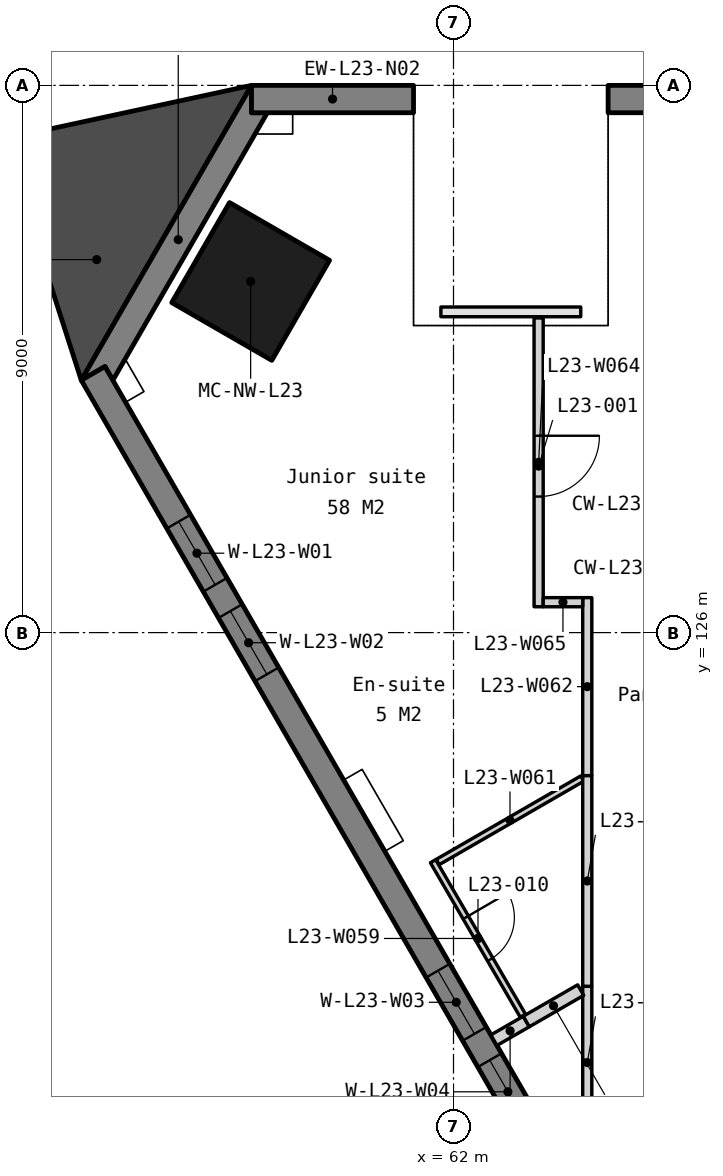
"""IFC4 building model, lengths in metres.
Left out: names, types, materials, properties, quantities, classifications, styles, units other than length and angle.
Written with IfcOpenShell. Run it as: python <this file> out.ifc"""

import sys

from ifc_helpers import new_model, si_unit, direction, frame, frame_2d, origin, origin_2d, place, context, subcontext, project, spatial, polyline, rectangle, outline, extrude, element, fill, save


model = new_model("IFC4")
c1 = context("Model", 3, precision=1e-05, world=origin(), true_north=direction((0.0, 1.0)))
c2 = subcontext(c1, "Body", "Model", "MODEL_VIEW")
j1 = project(units=[si_unit("LENGTHUNIT", "METRE"), si_unit("PLANEANGLEUNIT", "RADIAN")], contexts=[c1])
p1 = place(None, origin())
s1 = spatial("IfcSite", under=j1, at=p1, CompositionType="ELEMENT")
p2 = place(p1, origin())
s2 = spatial("IfcBuilding", under=s1, at=p2, CompositionType="ELEMENT")
p3 = place(p2, frame((0.0, 0.0, 95.8)))
s3 = spatial("IfcBuildingStorey", under=s2, at=p3, CompositionType="ELEMENT", Elevation=95.8)
p4 = place(p3, frame((58.664, 131.775, 0.0), z_axis=(0.0, 0.0, 1.0), x_axis=(-0.5, -0.866025403784, 0.0)))
e1 = element("IfcColumn", 1, at=p4, inside=s3, PredefinedType="COLUMN", context=c2, shape_type="SweptSolid", body=[
    extrude(rectangle(XDim=1.9, YDim=1.9, at=origin_2d()), origin(), (0.0, 0.0, 1.0), 3.5),
])
p5 = place(p3, frame((0.0, 0.0, -0.15)))
e2 = element("IfcWall", 2, at=p5, inside=s3, PredefinedType="SOLIDWALL", context=c2, shape_type="SweptSolid", body=[
    extrude(outline(polyline([(58.678, 135.0), (58.678, 134.55), (58.938, 134.55), (56.398, 130.15), (56.268, 130.375), (55.878, 130.15), (58.678, 135.0)])), origin(), (0.0, 0.0, 1.0), 3.5),
])
p6 = place(p3, frame((101.322, 134.775, -0.15), z_axis=(0.0, 0.0, 1.0), x_axis=(-1.0, 0.0, 0.0)))
e3 = element("IfcWall", 3, at=p6, inside=s3, PredefinedType="SOLIDWALL", context=c2, shape_type="SweptSolid", body=[
    extrude(outline(polyline([(0.0, 0.0), (0.0, 3.5), (36.779, 3.5), (36.779, 0.0), (0.0, 0.0)])), frame((0.0, 0.225, 0.0), z_axis=(0.0, -1.0, 0.0), x_axis=(1.0, 0.0, 0.0)), (0.0, 0.0, 1.0), 0.45),
])
p7 = place(p6, frame((2.814, 0.0, 1.05)))
e4 = element("IfcOpeningElement", 4, at=p7, cuts=e3, PredefinedType="OPENING", context=c2, shape_type="SweptSolid", body=[
    extrude(rectangle(XDim=1.2, YDim=1.5, at=frame_2d((0.6, 0.75))), frame((0.0, 0.235, 0.0), z_axis=(0.0, -1.0, 0.0), x_axis=(1.0, 0.0, 0.0)), (0.0, 0.0, 1.0), 0.47),
])
p8 = place(p6, frame((4.514, 0.0, 1.05)))
e5 = element("IfcOpeningElement", 5, at=p8, cuts=e3, PredefinedType="OPENING", context=c2, shape_type="SweptSolid", body=[
    extrude(rectangle(XDim=1.2, YDim=1.5, at=frame_2d((0.6, 0.75))), frame((0.0, 0.235, 0.0), z_axis=(0.0, -1.0, 0.0), x_axis=(1.0, 0.0, 0.0)), (0.0, 0.0, 1.0), 0.47),
])
p9 = place(p6, frame((11.343, 0.0, 1.05)))
e6 = element("IfcOpeningElement", 6, at=p9, cuts=e3, PredefinedType="OPENING", context=c2, shape_type="SweptSolid", body=[
    extrude(rectangle(XDim=1.2, YDim=1.5, at=frame_2d((0.6, 0.75))), frame((0.0, 0.235, 0.0), z_axis=(0.0, -1.0, 0.0), x_axis=(1.0, 0.0, 0.0)), (0.0, 0.0, 1.0), 0.47),
])
p10 = place(p6, frame((13.043, 0.0, 1.05)))
e7 = element("IfcOpeningElement", 7, at=p10, cuts=e3, PredefinedType="OPENING", context=c2, shape_type="SweptSolid", body=[
    extrude(rectangle(XDim=1.2, YDim=1.5, at=frame_2d((0.6, 0.75))), frame((0.0, 0.235, 0.0), z_axis=(0.0, -1.0, 0.0), x_axis=(1.0, 0.0, 0.0)), (0.0, 0.0, 1.0), 0.47),
])
p11 = place(p6, frame((19.872, 0.0, 1.05)))
e8 = element("IfcOpeningElement", 8, at=p11, cuts=e3, PredefinedType="OPENING", context=c2, shape_type="SweptSolid", body=[
    extrude(rectangle(XDim=1.2, YDim=1.5, at=frame_2d((0.6, 0.75))), frame((0.0, 0.235, 0.0), z_axis=(0.0, -1.0, 0.0), x_axis=(1.0, 0.0, 0.0)), (0.0, 0.0, 1.0), 0.47),
])
p12 = place(p6, frame((21.572, 0.0, 1.05)))
e9 = element("IfcOpeningElement", 9, at=p12, cuts=e3, PredefinedType="OPENING", context=c2, shape_type="SweptSolid", body=[
    extrude(rectangle(XDim=1.2, YDim=1.5, at=frame_2d((0.6, 0.75))), frame((0.0, 0.235, 0.0), z_axis=(0.0, -1.0, 0.0), x_axis=(1.0, 0.0, 0.0)), (0.0, 0.0, 1.0), 0.47),
])
p13 = place(p6, frame((28.4, 0.0, 1.05)))
e10 = element("IfcOpeningElement", 10, at=p13, cuts=e3, PredefinedType="OPENING", context=c2, shape_type="SweptSolid", body=[
    extrude(rectangle(XDim=1.2, YDim=1.5, at=frame_2d((0.6, 0.75))), frame((0.0, 0.235, 0.0), z_axis=(0.0, -1.0, 0.0), x_axis=(1.0, 0.0, 0.0)), (0.0, 0.0, 1.0), 0.47),
])
p14 = place(p6, frame((30.1, 0.0, 1.05)))
e11 = element("IfcOpeningElement", 11, at=p14, cuts=e3, PredefinedType="OPENING", context=c2, shape_type="SweptSolid", body=[
    extrude(rectangle(XDim=1.2, YDim=1.5, at=frame_2d((0.6, 0.75))), frame((0.0, 0.235, 0.0), z_axis=(0.0, -1.0, 0.0), x_axis=(1.0, 0.0, 0.0)), (0.0, 0.0, 1.0), 0.47),
])
p15 = place(p3, frame((61.343, 134.775, -0.15), z_axis=(0.0, 0.0, 1.0), x_axis=(-1.0, 0.0, 0.0)))
e12 = element("IfcWall", 12, at=p15, inside=s3, PredefinedType="SOLIDWALL", context=c2, shape_type="SweptSolid", body=[
    extrude(outline(polyline([(2.664, 3.5), (2.664, 0.0), (0.0, 0.0), (0.0, 3.5), (2.664, 3.5)])), frame((0.0, 0.225, 0.0), z_axis=(0.0, -1.0, 0.0), x_axis=(1.0, 0.0, 0.0)), (0.0, 0.0, 1.0), 0.45),
])
p16 = place(p3, frame((56.073, 130.263, -0.15), z_axis=(0.0, 0.0, 1.0), x_axis=(0.500000478905, -0.866025127289, 0.0)))
e13 = element("IfcWall", 13, at=p16, inside=s3, PredefinedType="SOLIDWALL", context=c2, shape_type="SweptSolid", body=[
    extrude(outline(polyline([(42.643, 0.0), (42.643, 3.5), (0.0, 3.5), (0.0, 0.0), (42.643, 0.0)])), frame((0.0, 0.225, 0.0), z_axis=(0.0, -1.0, 0.0), x_axis=(1.0, 0.0, 0.0)), (0.0, 0.0, 1.0), 0.45),
])
p17 = place(p16, frame((2.814, 0.0, 1.05)))
e14 = element("IfcOpeningElement", 14, at=p17, cuts=e13, PredefinedType="OPENING", context=c2, shape_type="SweptSolid", body=[
    extrude(rectangle(XDim=1.2, YDim=1.5, at=frame_2d((0.6, 0.75))), frame((0.0, 0.235, 0.0), z_axis=(0.0, -1.0, 0.0), x_axis=(1.0, 0.0, 0.0)), (0.0, 0.0, 1.0), 0.47),
])
p18 = place(p16, frame((4.514, 0.0, 1.05)))
e15 = element("IfcOpeningElement", 15, at=p18, cuts=e13, PredefinedType="OPENING", context=c2, shape_type="SweptSolid", body=[
    extrude(rectangle(XDim=1.2, YDim=1.5, at=frame_2d((0.6, 0.75))), frame((0.0, 0.235, 0.0), z_axis=(0.0, -1.0, 0.0), x_axis=(1.0, 0.0, 0.0)), (0.0, 0.0, 1.0), 0.47),
])
p19 = place(p16, frame((11.343, 0.0, 1.05)))
e16 = element("IfcOpeningElement", 16, at=p19, cuts=e13, PredefinedType="OPENING", context=c2, shape_type="SweptSolid", body=[
    extrude(rectangle(XDim=1.2, YDim=1.5, at=frame_2d((0.6, 0.75))), frame((0.0, 0.235, 0.0), z_axis=(0.0, -1.0, 0.0), x_axis=(1.0, 0.0, 0.0)), (0.0, 0.0, 1.0), 0.47),
])
p20 = place(p16, frame((13.043, 0.0, 1.05)))
e17 = element("IfcOpeningElement", 17, at=p20, cuts=e13, PredefinedType="OPENING", context=c2, shape_type="SweptSolid", body=[
    extrude(rectangle(XDim=1.2, YDim=1.5, at=frame_2d((0.6, 0.75))), frame((0.0, 0.235, 0.0), z_axis=(0.0, -1.0, 0.0), x_axis=(1.0, 0.0, 0.0)), (0.0, 0.0, 1.0), 0.47),
])
p21 = place(p16, frame((19.872, 0.0, 1.05)))
e18 = element("IfcOpeningElement", 18, at=p21, cuts=e13, PredefinedType="OPENING", context=c2, shape_type="SweptSolid", body=[
    extrude(rectangle(XDim=1.2, YDim=1.5, at=frame_2d((0.6, 0.75))), frame((0.0, 0.235, 0.0), z_axis=(0.0, -1.0, 0.0), x_axis=(1.0, 0.0, 0.0)), (0.0, 0.0, 1.0), 0.47),
])
p22 = place(p16, frame((21.572, 0.0, 1.05)))
e19 = element("IfcOpeningElement", 19, at=p22, cuts=e13, PredefinedType="OPENING", context=c2, shape_type="SweptSolid", body=[
    extrude(rectangle(XDim=1.2, YDim=1.5, at=frame_2d((0.6, 0.75))), frame((0.0, 0.235, 0.0), z_axis=(0.0, -1.0, 0.0), x_axis=(1.0, 0.0, 0.0)), (0.0, 0.0, 1.0), 0.47),
])
p23 = place(p16, frame((28.4, 0.0, 1.05)))
e20 = element("IfcOpeningElement", 20, at=p23, cuts=e13, PredefinedType="OPENING", context=c2, shape_type="SweptSolid", body=[
    extrude(rectangle(XDim=1.2, YDim=1.5, at=frame_2d((0.6, 0.75))), frame((0.0, 0.235, 0.0), z_axis=(0.0, -1.0, 0.0), x_axis=(1.0, 0.0, 0.0)), (0.0, 0.0, 1.0), 0.47),
])
p24 = place(p16, frame((30.1, 0.0, 1.05)))
e21 = element("IfcOpeningElement", 21, at=p24, cuts=e13, PredefinedType="OPENING", context=c2, shape_type="SweptSolid", body=[
    extrude(rectangle(XDim=1.2, YDim=1.5, at=frame_2d((0.6, 0.75))), frame((0.0, 0.235, 0.0), z_axis=(0.0, -1.0, 0.0), x_axis=(1.0, 0.0, 0.0)), (0.0, 0.0, 1.0), 0.47),
])
p25 = place(p16, frame((36.929, 0.0, 1.05)))
e22 = element("IfcOpeningElement", 22, at=p25, cuts=e13, PredefinedType="OPENING", context=c2, shape_type="SweptSolid", body=[
    extrude(rectangle(XDim=1.2, YDim=1.5, at=frame_2d((0.6, 0.75))), frame((0.0, 0.235, 0.0), z_axis=(0.0, -1.0, 0.0), x_axis=(1.0, 0.0, 0.0)), (0.0, 0.0, 1.0), 0.47),
])
p26 = place(p16, frame((38.629, 0.0, 1.05)))
e23 = element("IfcOpeningElement", 23, at=p26, cuts=e13, PredefinedType="OPENING", context=c2, shape_type="SweptSolid", body=[
    extrude(rectangle(XDim=1.2, YDim=1.5, at=frame_2d((0.6, 0.75))), frame((0.0, 0.235, 0.0), z_axis=(0.0, -1.0, 0.0), x_axis=(1.0, 0.0, 0.0)), (0.0, 0.0, 1.0), 0.47),
])
p27 = place(p2, frame((0.0, 0.0, 92.3)))
s4 = spatial("IfcBuildingStorey", under=s2, at=p27, CompositionType="ELEMENT", Elevation=92.3)
for number, where, z_axis, x_axis in (
    (24, (64.318, 135.0, 0.0), (0.0, 0.0, 1.0), (0.0, -1.0, 0.0)),
    (25, (61.568, 135.0, 0.0), (0.0, 0.0, 1.0), (0.0, -1.0, 0.0)),
):
    element("IfcWall", number, at=place(p27, frame(where, z_axis=z_axis, x_axis=x_axis)), inside=s4, PredefinedType="SOLIDWALL", context=c2, shape_type="SweptSolid", body=[
        extrude(rectangle(XDim=3.95, YDim=0.45, at=frame_2d((1.975, 0.0))), origin(), (0.0, 0.0, 1.0), 6.85),
    ])
p28 = place(p3, frame((0.0, 0.0, -0.15)))
e26 = element("IfcWall", 26, at=p28, inside=s3, PredefinedType="SOLIDWALL", context=c2, shape_type="SweptSolid", body=[
    extrude(outline(polyline([(58.678, 135.0), (54.603, 134.118), (55.878, 130.15), (58.678, 135.0)])), origin(), (0.0, 0.0, 1.0), 3.5),
])
p29 = place(p3, frame((64.2, 117.675, 0.0), z_axis=(0.0, 0.0, 1.0), x_axis=(0.0, 1.0, 0.0)))
e27 = element("IfcWall", 27, at=p29, inside=s3, PredefinedType="PARTITIONING", context=c2, shape_type="SweptSolid", body=[
    extrude(rectangle(XDim=2.508, YDim=0.15, at=frame_2d((1.254, 0.0))), origin(), (0.0, 0.0, 1.0), 3.35),
])
p30 = place(p3, frame((62.665, 119.296, 0.0), z_axis=(0.0, 0.0, 1.0), x_axis=(0.86615915044, 0.499768272412, 0.0)))
e28 = element("IfcWall", 28, at=p30, inside=s3, PredefinedType="PARTITIONING", context=c2, shape_type="SweptSolid", body=[
    extrude(rectangle(XDim=0.615, YDim=0.2, at=frame_2d((0.308, 0.0))), origin(), (0.0, 0.0, 1.0), 3.35),
])
p31 = place(p3, frame((61.663, 122.24, 0.0), z_axis=(0.0, 0.0, 1.0), x_axis=(0.502884554521, -0.864353587847, 0.0)))
e29 = element("IfcWall", 29, at=p31, inside=s3, PredefinedType="PARTITIONING", context=c2, shape_type="SweptSolid", body=[
    extrude(rectangle(XDim=2.94, YDim=0.1, at=frame_2d((1.47, 0.0))), origin(), (0.0, 0.0, 1.0), 3.35),
])
p32 = place(p31, frame((1.07, 0.0, 0.0)))
e30 = element("IfcOpeningElement", 30, at=p32, cuts=e29, PredefinedType="OPENING", context=c2, shape_type="SweptSolid", body=[
    extrude(rectangle(XDim=0.8, YDim=2.1, at=frame_2d((0.4, 1.05))), frame((0.0, 0.06, 0.0), z_axis=(0.0, -1.0, 0.0), x_axis=(1.0, 0.0, 0.0)), (0.0, 0.0, 1.0), 0.12),
])
p33 = place(p3, frame((63.197, 119.604, 0.0), z_axis=(0.0, 0.0, 1.0), x_axis=(0.866067506982, 0.499927068031, 0.0)))
e31 = element("IfcWall", 31, at=p33, inside=s3, PredefinedType="PARTITIONING", context=c2, shape_type="SweptSolid", body=[
    extrude(rectangle(XDim=1.033, YDim=0.2, at=frame_2d((0.517, 0.0))), origin(), (0.0, 0.0, 1.0), 3.35),
])
p34 = place(p3, frame((61.74, 122.227, 0.0), z_axis=(0.0, 0.0, 1.0), x_axis=(0.866012292785, 0.50002270823, 0.0)))
e32 = element("IfcWall", 32, at=p34, inside=s3, PredefinedType="PARTITIONING", context=c2, shape_type="SweptSolid", body=[
    extrude(rectangle(XDim=2.745, YDim=0.1, at=frame_2d((1.373, 0.0))), origin(), (0.0, 0.0, 1.0), 3.35),
])
p35 = place(p3, frame((64.2, 123.647, 0.0), z_axis=(0.0, 0.0, 1.0), x_axis=(0.0, 1.0, 0.0)))
e33 = element("IfcWall", 33, at=p35, inside=s3, PredefinedType="PARTITIONING", context=c2, shape_type="SweptSolid", body=[
    extrude(rectangle(XDim=2.928, YDim=0.15, at=frame_2d((1.464, 0.0))), origin(), (0.0, 0.0, 1.0), 3.35),
])
p36 = place(p3, frame((64.2, 120.183, 0.0), z_axis=(0.0, 0.0, 1.0), x_axis=(0.0, 1.0, 0.0)))
e34 = element("IfcWall", 34, at=p36, inside=s3, PredefinedType="PARTITIONING", context=c2, shape_type="SweptSolid", body=[
    extrude(rectangle(XDim=3.464, YDim=0.15, at=frame_2d((1.732, 0.0))), origin(), (0.0, 0.0, 1.0), 3.35),
])
p37 = place(p3, frame((63.4, 131.175, 0.0), z_axis=(0.0, 0.0, 1.0), x_axis=(0.000102796052, -0.999999994716, 0.0)))
e35 = element("IfcWall", 35, at=p37, inside=s3, PredefinedType="PARTITIONING", context=c2, shape_type="SweptSolid", body=[
    extrude(rectangle(XDim=4.75, YDim=0.15, at=frame_2d((2.375, 0.0))), origin(), (0.0, 0.0, 1.0), 3.35),
])
p38 = place(p37, frame((1.938, 0.0, 0.0)))
e36 = element("IfcOpeningElement", 36, at=p38, cuts=e35, PredefinedType="OPENING", context=c2, shape_type="SweptSolid", body=[
    extrude(rectangle(XDim=1.0, YDim=2.1, at=frame_2d((0.5, 1.05))), frame((0.0, 0.085, 0.0), z_axis=(0.0, -1.0, 0.0), x_axis=(1.0, 0.0, 0.0)), (0.0, 0.0, 1.0), 0.17),
])
p39 = place(p3, frame((63.476, 126.5, 0.0), z_axis=(0.0, 0.0, 1.0), x_axis=(1.0, 0.0, 0.0)))
e37 = element("IfcWall", 37, at=p39, inside=s3, PredefinedType="PARTITIONING", context=c2, shape_type="SweptSolid", body=[
    extrude(rectangle(XDim=0.649, YDim=0.15, at=frame_2d((0.325, 0.0))), origin(), (0.0, 0.0, 1.0), 3.35),
])
p40 = place(p17, origin())
e38 = element("IfcWindow", 38, at=p40, inside=s3, PartitioningType="SINGLE_PANEL", PredefinedType="WINDOW", context=c2, shape_type="SweptSolid", body=[
    extrude(rectangle(XDim=1.2, YDim=1.5, at=frame_2d((0.6, 0.75))), frame((0.0, 0.03, 0.0), z_axis=(0.0, -1.0, 0.0), x_axis=(1.0, 0.0, 0.0)), (0.0, 0.0, 1.0), 0.06),
])
fill(e14, e38)
p41 = place(p18, origin())
e39 = element("IfcWindow", 39, at=p41, inside=s3, PartitioningType="SINGLE_PANEL", PredefinedType="WINDOW", context=c2, shape_type="SweptSolid", body=[
    extrude(rectangle(XDim=1.2, YDim=1.5, at=frame_2d((0.6, 0.75))), frame((0.0, 0.03, 0.0), z_axis=(0.0, -1.0, 0.0), x_axis=(1.0, 0.0, 0.0)), (0.0, 0.0, 1.0), 0.06),
])
fill(e15, e39)
p42 = place(p19, origin())
e40 = element("IfcWindow", 40, at=p42, inside=s3, PartitioningType="SINGLE_PANEL", PredefinedType="WINDOW", context=c2, shape_type="SweptSolid", body=[
    extrude(rectangle(XDim=1.2, YDim=1.5, at=frame_2d((0.6, 0.75))), frame((0.0, 0.03, 0.0), z_axis=(0.0, -1.0, 0.0), x_axis=(1.0, 0.0, 0.0)), (0.0, 0.0, 1.0), 0.06),
])
fill(e16, e40)
p43 = place(p20, origin())
e41 = element("IfcWindow", 41, at=p43, inside=s3, PartitioningType="SINGLE_PANEL", PredefinedType="WINDOW", context=c2, shape_type="SweptSolid", body=[
    extrude(rectangle(XDim=1.2, YDim=1.5, at=frame_2d((0.6, 0.75))), frame((0.0, 0.03, 0.0), z_axis=(0.0, -1.0, 0.0), x_axis=(1.0, 0.0, 0.0)), (0.0, 0.0, 1.0), 0.06),
])
fill(e17, e41)
p44 = place(p38, origin())
e42 = element("IfcDoor", 42, at=p44, inside=s3, OperationType="SINGLE_SWING_LEFT", PredefinedType="DOOR", context=c2, shape_type="SweptSolid", body=[
    extrude(rectangle(XDim=1.0, YDim=2.1, at=frame_2d((0.5, 1.05))), frame((0.0, 0.025, 0.0), z_axis=(0.0, -1.0, 0.0), x_axis=(1.0, 0.0, 0.0)), (0.0, 0.0, 1.0), 0.05),
])
fill(e36, e42)
p45 = place(p32, origin())
e43 = element("IfcDoor", 43, at=p45, inside=s3, OperationType="SINGLE_SWING_LEFT", PredefinedType="DOOR", context=c2, shape_type="SweptSolid", body=[
    extrude(rectangle(XDim=0.8, YDim=2.1, at=frame_2d((0.4, 1.05))), frame((0.0, 0.025, 0.0), z_axis=(0.0, -1.0, 0.0), x_axis=(1.0, 0.0, 0.0)), (0.0, 0.0, 1.0), 0.05),
])
fill(e30, e43)
save(model, sys.argv[1])
